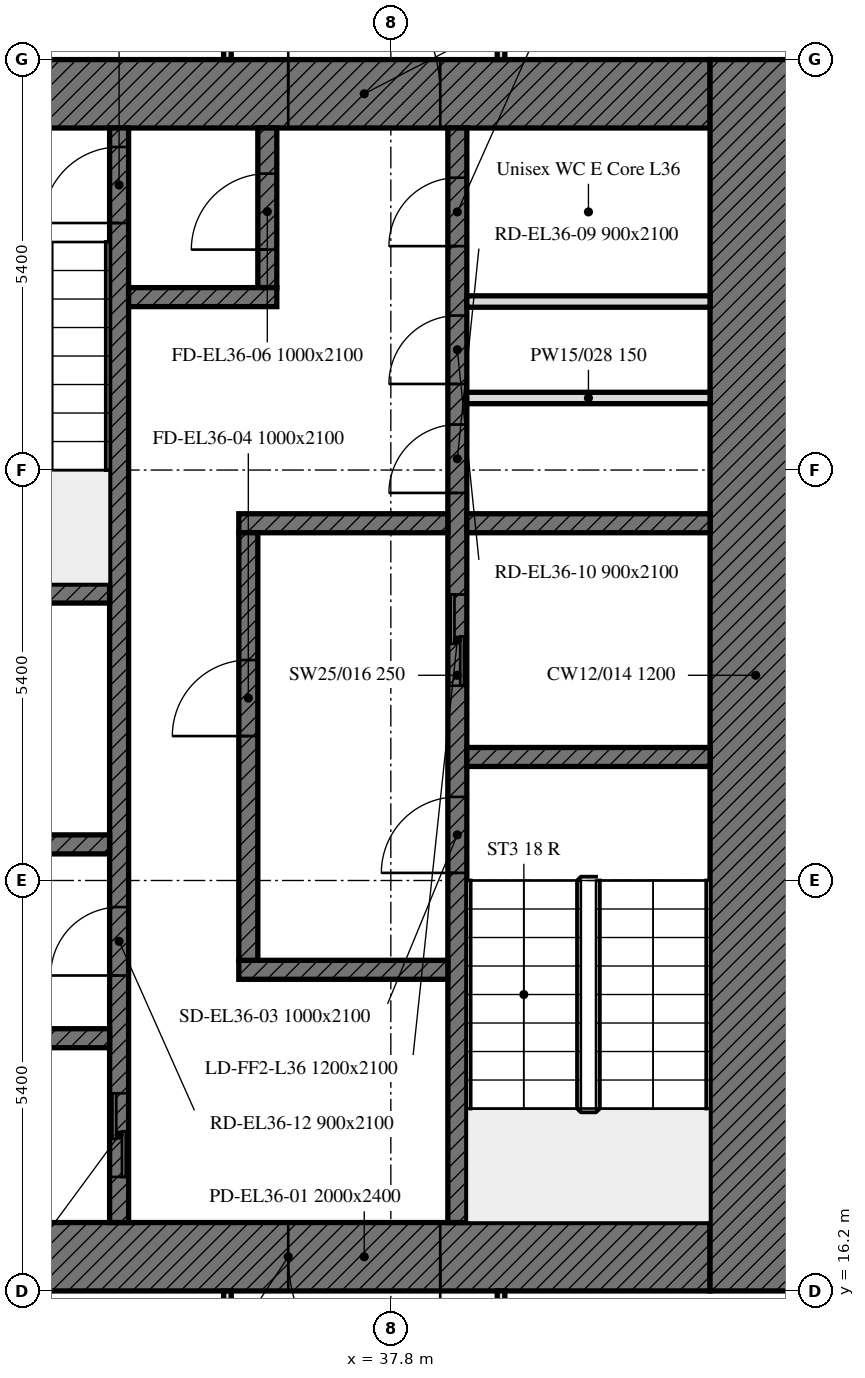
"""IFC4 building model, lengths in metres.
Left out: names, types, materials, properties, quantities, classifications, styles, units other than length and angle.
Written with IfcOpenShell. Run it as: python <this file> out.ifc"""

import sys

from ifc_helpers import new_model, si_unit, direction, frame, frame_2d, origin, place, context, subcontext, project, spatial, rectangle, extrude, element, fill, save


model = new_model("IFC4")
c1 = context("Model", 3, precision=1e-05, world=origin(), true_north=direction((0.0, 1.0)))
c2 = subcontext(c1, "Body", "Model", "MODEL_VIEW")
j1 = project(units=[si_unit("LENGTHUNIT", "METRE"), si_unit("PLANEANGLEUNIT", "RADIAN")], contexts=[c1])
p1 = place(None, origin())
s1 = spatial("IfcSite", under=j1, at=p1, CompositionType="ELEMENT")
p2 = place(p1, origin())
s2 = spatial("IfcBuilding", under=s1, at=p2, CompositionType="ELEMENT")
p3 = place(p2, frame((0.0, 0.0, 156.1)))
s3 = spatial("IfcBuildingStorey", under=s2, at=p3, CompositionType="ELEMENT", Elevation=156.1)
p4 = place(p3, frame((42.0, 16.65, 0.0), z_axis=(0.0, 0.0, 1.0), x_axis=(-1.0, 0.0, 0.0)))
e1 = element("IfcWall", 1, at=p4, inside=s3, PredefinedType="SOLIDWALL", context=c2, shape_type="SweptSolid", body=[
    extrude(rectangle(XDim=11.1, YDim=0.9, at=frame_2d((5.55, 0.0))), origin(), (0.0, 0.0, 1.0), 3.0),
])
p5 = place(p4, frame((3.55, 0.0, 0.0)))
e2 = element("IfcOpeningElement", 2, at=p5, cuts=e1, PredefinedType="OPENING", context=c2, shape_type="SweptSolid", body=[
    extrude(rectangle(XDim=2.0, YDim=2.4, at=frame_2d((1.0, 1.2))), frame((0.0, 0.45, 0.0), z_axis=(0.0, -1.0, 0.0), x_axis=(1.0, 0.0, 0.0)), (0.0, 0.0, 1.0), 0.9),
])
p6 = place(p3, frame((30.9, 31.95, 0.0), z_axis=(0.0, 0.0, 1.0), x_axis=(1.0, 0.0, 0.0)))
e3 = element("IfcWall", 3, at=p6, inside=s3, PredefinedType="SOLIDWALL", context=c2, shape_type="SweptSolid", body=[
    extrude(rectangle(XDim=11.1, YDim=0.9, at=frame_2d((5.55, 0.0))), origin(), (0.0, 0.0, 1.0), 3.0),
])
p7 = place(p6, frame((5.55, 0.0, 0.0)))
e4 = element("IfcOpeningElement", 4, at=p7, cuts=e3, PredefinedType="OPENING", context=c2, shape_type="SweptSolid", body=[
    extrude(rectangle(XDim=2.0, YDim=2.4, at=frame_2d((1.0, 1.2))), frame((0.0, 0.45, 0.0), z_axis=(0.0, -1.0, 0.0), x_axis=(1.0, 0.0, 0.0)), (0.0, 0.0, 1.0), 0.9),
])
p8 = place(p3, frame((42.6, 32.4, 0.0), z_axis=(0.0, 0.0, 1.0), x_axis=(0.0, -1.0, 0.0)))
e5 = element("IfcWall", 5, at=p8, inside=s3, PredefinedType="SOLIDWALL", context=c2, shape_type="SweptSolid", body=[
    extrude(rectangle(XDim=16.2, YDim=1.2, at=frame_2d((8.1, 0.0))), origin(), (0.0, 0.0, 1.0), 3.0),
])
p9 = place(p3, frame((38.675, 17.1, 0.0), z_axis=(0.0, 0.0, 1.0), x_axis=(0.0, 1.0, 0.0)))
e6 = element("IfcWall", 6, at=p9, inside=s3, PredefinedType="SOLIDWALL", context=c2, shape_type="SweptSolid", body=[
    extrude(rectangle(XDim=14.4, YDim=0.25, at=frame_2d((7.2, 0.0))), origin(), (0.0, 0.0, 1.0), 3.0),
])
p10 = place(p9, frame((4.6, 0.0, 0.0)))
e7 = element("IfcOpeningElement", 7, at=p10, cuts=e6, PredefinedType="OPENING", context=c2, shape_type="SweptSolid", body=[
    extrude(rectangle(XDim=1.0, YDim=2.1, at=frame_2d((0.5, 1.05))), frame((0.0, 0.125, 0.0), z_axis=(0.0, -1.0, 0.0), x_axis=(1.0, 0.0, 0.0)), (0.0, 0.0, 1.0), 0.25),
])
p11 = place(p9, frame((7.062, 0.0, 0.0)))
e8 = element("IfcOpeningElement", 8, at=p11, cuts=e6, PredefinedType="OPENING", context=c2, shape_type="SweptSolid", body=[
    extrude(rectangle(XDim=1.2, YDim=2.1, at=frame_2d((0.6, 1.05))), frame((0.0, 0.125, 0.0), z_axis=(0.0, -1.0, 0.0), x_axis=(1.0, 0.0, 0.0)), (0.0, 0.0, 1.0), 0.25),
])
p12 = place(p9, frame((9.599, 0.0, 0.0)))
e9 = element("IfcOpeningElement", 9, at=p12, cuts=e6, PredefinedType="OPENING", context=c2, shape_type="SweptSolid", body=[
    extrude(rectangle(XDim=0.9, YDim=2.1, at=frame_2d((0.45, 1.05))), frame((0.0, 0.125, 0.0), z_axis=(0.0, -1.0, 0.0), x_axis=(1.0, 0.0, 0.0)), (0.0, 0.0, 1.0), 0.25),
])
p13 = place(p9, frame((11.032, 0.0, 0.0)))
e10 = element("IfcOpeningElement", 10, at=p13, cuts=e6, PredefinedType="OPENING", context=c2, shape_type="SweptSolid", body=[
    extrude(rectangle(XDim=0.9, YDim=2.1, at=frame_2d((0.45, 1.05))), frame((0.0, 0.125, 0.0), z_axis=(0.0, -1.0, 0.0), x_axis=(1.0, 0.0, 0.0)), (0.0, 0.0, 1.0), 0.25),
])
p14 = place(p9, frame((12.846, 0.0, 0.0)))
e11 = element("IfcOpeningElement", 11, at=p14, cuts=e6, PredefinedType="OPENING", context=c2, shape_type="SweptSolid", body=[
    extrude(rectangle(XDim=0.9, YDim=2.1, at=frame_2d((0.45, 1.05))), frame((0.0, 0.125, 0.0), z_axis=(0.0, -1.0, 0.0), x_axis=(1.0, 0.0, 0.0)), (0.0, 0.0, 1.0), 0.25),
])
p15 = place(p3, frame((34.225, 17.1, 0.0), z_axis=(0.0, 0.0, 1.0), x_axis=(0.0, 1.0, 0.0)))
e12 = element("IfcWall", 12, at=p15, inside=s3, PredefinedType="SOLIDWALL", context=c2, shape_type="SweptSolid", body=[
    extrude(rectangle(XDim=14.4, YDim=0.25, at=frame_2d((7.2, 0.0))), origin(), (0.0, 0.0, 1.0), 3.0),
])
p16 = place(p15, frame((13.15, 0.0, 0.0)))
e13 = element("IfcOpeningElement", 13, at=p16, cuts=e12, PredefinedType="OPENING", context=c2, shape_type="SweptSolid", body=[
    extrude(rectangle(XDim=1.0, YDim=2.1, at=frame_2d((0.5, 1.05))), frame((0.0, 0.125, 0.0), z_axis=(0.0, -1.0, 0.0), x_axis=(1.0, 0.0, 0.0)), (0.0, 0.0, 1.0), 0.25),
])
p17 = place(p15, frame((0.6, 0.0, 0.0)))
e14 = element("IfcOpeningElement", 14, at=p17, cuts=e12, PredefinedType="OPENING", context=c2, shape_type="SweptSolid", body=[
    extrude(rectangle(XDim=1.1, YDim=2.1, at=frame_2d((0.55, 1.05))), frame((0.0, 0.125, 0.0), z_axis=(0.0, -1.0, 0.0), x_axis=(1.0, 0.0, 0.0)), (0.0, 0.0, 1.0), 0.25),
])
p18 = place(p15, frame((3.25, 0.0, 0.0)))
e15 = element("IfcOpeningElement", 15, at=p18, cuts=e12, PredefinedType="OPENING", context=c2, shape_type="SweptSolid", body=[
    extrude(rectangle(XDim=0.9, YDim=2.1, at=frame_2d((0.45, 1.05))), frame((0.0, 0.125, 0.0), z_axis=(0.0, -1.0, 0.0), x_axis=(1.0, 0.0, 0.0)), (0.0, 0.0, 1.0), 0.25),
])
p19 = place(p3, frame((38.8, 23.225, 0.0), z_axis=(0.0, 0.0, 1.0), x_axis=(1.0, 0.0, 0.0)))
e16 = element("IfcWall", 16, at=p19, inside=s3, PredefinedType="SOLIDWALL", context=c2, shape_type="SweptSolid", body=[
    extrude(rectangle(XDim=3.2, YDim=0.25, at=frame_2d((1.6, 0.0))), origin(), (0.0, 0.0, 1.0), 3.0),
])
for number, where, z_axis, x_axis in (
    (17, (30.9, 25.375, 0.0), (0.0, 0.0, 1.0), (1.0, 0.0, 0.0)),
    (18, (30.9, 22.075, 0.0), (0.0, 0.0, 1.0), (1.0, 0.0, 0.0)),
):
    element("IfcWall", number, at=place(p3, frame(where, z_axis=z_axis, x_axis=x_axis)), inside=s3, PredefinedType="SOLIDWALL", context=c2, shape_type="SweptSolid", body=[
        extrude(rectangle(XDim=3.2, YDim=0.25, at=frame_2d((1.6, 0.0))), origin(), (0.0, 0.0, 1.0), 3.0),
    ])
p20 = place(p3, frame((38.8, 26.3, 0.0), z_axis=(0.0, 0.0, 1.0), x_axis=(1.0, 0.0, 0.0)))
e19 = element("IfcWall", 19, at=p20, inside=s3, PredefinedType="SOLIDWALL", context=c2, shape_type="SweptSolid", body=[
    extrude(rectangle(XDim=3.2, YDim=0.25, at=frame_2d((1.6, 0.0))), origin(), (0.0, 0.0, 1.0), 3.0),
])
for number, where, z_axis, x_axis in (
    (20, (35.8, 26.3, 0.0), (0.0, 0.0, 1.0), (1.0, 0.0, 0.0)),
    (21, (35.8, 20.425, 0.0), (0.0, 0.0, 1.0), (1.0, 0.0, 0.0)),
):
    element("IfcWall", number, at=place(p3, frame(where, z_axis=z_axis, x_axis=x_axis)), inside=s3, PredefinedType="SOLIDWALL", context=c2, shape_type="SweptSolid", body=[
        extrude(rectangle(XDim=2.75, YDim=0.25, at=frame_2d((1.375, 0.0))), origin(), (0.0, 0.0, 1.0), 3.0),
    ])
p21 = place(p3, frame((36.175, 29.4, 0.0), z_axis=(0.0, 0.0, 1.0), x_axis=(0.0, 1.0, 0.0)))
e22 = element("IfcWall", 22, at=p21, inside=s3, PredefinedType="SOLIDWALL", context=c2, shape_type="SweptSolid", body=[
    extrude(rectangle(XDim=2.1, YDim=0.25, at=frame_2d((1.05, 0.0))), origin(), (0.0, 0.0, 1.0), 3.0),
])
p22 = place(p21, frame((0.5, 0.0, 0.0)))
e23 = element("IfcOpeningElement", 23, at=p22, cuts=e22, PredefinedType="OPENING", context=c2, shape_type="SweptSolid", body=[
    extrude(rectangle(XDim=1.0, YDim=2.1, at=frame_2d((0.5, 1.05))), frame((0.0, 0.125, 0.0), z_axis=(0.0, -1.0, 0.0), x_axis=(1.0, 0.0, 0.0)), (0.0, 0.0, 1.0), 0.25),
])
p23 = place(p3, frame((34.35, 29.275, 0.0), z_axis=(0.0, 0.0, 1.0), x_axis=(1.0, 0.0, 0.0)))
e24 = element("IfcWall", 24, at=p23, inside=s3, PredefinedType="SOLIDWALL", context=c2, shape_type="SweptSolid", body=[
    extrude(rectangle(XDim=1.95, YDim=0.25, at=frame_2d((0.975, 0.0))), origin(), (0.0, 0.0, 1.0), 3.0),
])
p24 = place(p3, frame((35.925, 20.55, 0.0), z_axis=(0.0, 0.0, 1.0), x_axis=(0.0, 1.0, 0.0)))
e25 = element("IfcWall", 25, at=p24, inside=s3, PredefinedType="SOLIDWALL", context=c2, shape_type="SweptSolid", body=[
    extrude(rectangle(XDim=5.625, YDim=0.25, at=frame_2d((2.812, 0.0))), origin(), (0.0, 0.0, 1.0), 3.0),
])
p25 = place(p24, frame((2.95, 0.0, 0.0)))
e26 = element("IfcOpeningElement", 26, at=p25, cuts=e25, PredefinedType="OPENING", context=c2, shape_type="SweptSolid", body=[
    extrude(rectangle(XDim=1.0, YDim=2.1, at=frame_2d((0.5, 1.05))), frame((0.0, 0.125, 0.0), z_axis=(0.0, -1.0, 0.0), x_axis=(1.0, 0.0, 0.0)), (0.0, 0.0, 1.0), 0.25),
])
p26 = place(p3, frame((30.9, 19.525, 0.0), z_axis=(0.0, 0.0, 1.0), x_axis=(1.0, 0.0, 0.0)))
e27 = element("IfcWall", 27, at=p26, inside=s3, PredefinedType="SOLIDWALL", context=c2, shape_type="SweptSolid", body=[
    extrude(rectangle(XDim=3.2, YDim=0.25, at=frame_2d((1.6, 0.0))), origin(), (0.0, 0.0, 1.0), 3.0),
])
for number, where, z_axis, x_axis in (
    (28, (38.8, 27.948, 0.0), (0.0, 0.0, 1.0), (1.0, 0.0, 0.0)),
    (29, (38.8, 29.217, 0.0), (0.0, 0.0, 1.0), (1.0, 0.0, 0.0)),
):
    element("IfcWall", number, at=place(p3, frame(where, z_axis=z_axis, x_axis=x_axis)), inside=s3, PredefinedType="PARTITIONING", context=c2, shape_type="SweptSolid", body=[
        extrude(rectangle(XDim=3.2, YDim=0.15, at=frame_2d((1.6, 0.0))), origin(), (0.0, 0.0, 1.0), 3.0),
    ])
for number, where, z_axis, x_axis in (
    (30, (35.65, 35.025, 0.0), (0.0, 0.0, 1.0), (0.0, -1.0, 0.0)),
    (31, (39.25, 32.4, 0.0), (0.0, 0.0, 1.0), (0.0, 1.0, 0.0)),
):
    element("IfcWall", number, at=place(p3, frame(where, z_axis=z_axis, x_axis=x_axis)), inside=s3, PredefinedType="PARTITIONING", context=c2, shape_type="SweptSolid", body=[
        extrude(rectangle(XDim=2.625, YDim=0.1, at=frame_2d((1.312, 0.0))), origin(), (0.0, 0.0, 1.0), 3.0),
    ])
for number, where, z_axis, x_axis in (
    (32, (35.65, 16.2, 0.0), (0.0, 0.0, 1.0), (0.0, -1.0, 0.0)),
    (33, (39.25, 9.075, 0.0), (0.0, 0.0, 1.0), (0.0, 1.0, 0.0)),
):
    element("IfcWall", number, at=place(p3, frame(where, z_axis=z_axis, x_axis=x_axis)), inside=s3, PredefinedType="PARTITIONING", context=c2, shape_type="SweptSolid", body=[
        extrude(rectangle(XDim=7.125, YDim=0.1, at=frame_2d((3.562, 0.0))), origin(), (0.0, 0.0, 1.0), 2.4),
    ])
p27 = place(p5, origin())
e34 = element("IfcDoor", 34, at=p27, inside=s3, OperationType="DOUBLE_DOOR_SINGLE_SWING", PredefinedType="DOOR", context=c2, shape_type="SweptSolid", body=[
    extrude(rectangle(XDim=2.0, YDim=2.4, at=frame_2d((1.0, 1.2))), frame((0.0, 0.025, 0.0), z_axis=(0.0, -1.0, 0.0), x_axis=(1.0, 0.0, 0.0)), (0.0, 0.0, 1.0), 0.05),
])
fill(e2, e34)
p28 = place(p7, origin())
e35 = element("IfcDoor", 35, at=p28, inside=s3, OperationType="DOUBLE_DOOR_SINGLE_SWING", PredefinedType="DOOR", context=c2, shape_type="SweptSolid", body=[
    extrude(rectangle(XDim=2.0, YDim=2.4, at=frame_2d((1.0, 1.2))), frame((0.0, 0.025, 0.0), z_axis=(0.0, -1.0, 0.0), x_axis=(1.0, 0.0, 0.0)), (0.0, 0.0, 1.0), 0.05),
])
fill(e4, e35)
p29 = place(p10, origin())
e36 = element("IfcDoor", 36, at=p29, inside=s3, OperationType="SINGLE_SWING_LEFT", PredefinedType="DOOR", context=c2, shape_type="SweptSolid", body=[
    extrude(rectangle(XDim=1.0, YDim=2.1, at=frame_2d((0.5, 1.05))), frame((0.0, 0.025, 0.0), z_axis=(0.0, -1.0, 0.0), x_axis=(1.0, 0.0, 0.0)), (0.0, 0.0, 1.0), 0.05),
])
fill(e7, e36)
p30 = place(p25, origin())
e37 = element("IfcDoor", 37, at=p30, inside=s3, OperationType="SINGLE_SWING_LEFT", PredefinedType="DOOR", context=c2, shape_type="SweptSolid", body=[
    extrude(rectangle(XDim=1.0, YDim=2.1, at=frame_2d((0.5, 1.05))), frame((0.0, 0.025, 0.0), z_axis=(0.0, -1.0, 0.0), x_axis=(1.0, 0.0, 0.0)), (0.0, 0.0, 1.0), 0.05),
])
fill(e26, e37)
p31 = place(p16, origin())
e38 = element("IfcDoor", 38, at=p31, inside=s3, OperationType="SINGLE_SWING_LEFT", PredefinedType="DOOR", context=c2, shape_type="SweptSolid", body=[
    extrude(rectangle(XDim=1.0, YDim=2.1, at=frame_2d((0.5, 1.05))), frame((0.0, 0.025, 0.0), z_axis=(0.0, -1.0, 0.0), x_axis=(1.0, 0.0, 0.0)), (0.0, 0.0, 1.0), 0.05),
])
fill(e13, e38)
p32 = place(p22, origin())
e39 = element("IfcDoor", 39, at=p32, inside=s3, OperationType="SINGLE_SWING_LEFT", PredefinedType="DOOR", context=c2, shape_type="SweptSolid", body=[
    extrude(rectangle(XDim=1.0, YDim=2.1, at=frame_2d((0.5, 1.05))), frame((0.0, 0.025, 0.0), z_axis=(0.0, -1.0, 0.0), x_axis=(1.0, 0.0, 0.0)), (0.0, 0.0, 1.0), 0.05),
])
fill(e23, e39)
p33 = place(p11, origin())
e40 = element("IfcDoor", 40, at=p33, inside=s3, OperationType="DOUBLE_DOOR_SLIDING", PredefinedType="DOOR", context=c2, shape_type="SweptSolid", body=[
    extrude(rectangle(XDim=1.2, YDim=2.1, at=frame_2d((0.6, 1.05))), frame((0.0, 0.025, 0.0), z_axis=(0.0, -1.0, 0.0), x_axis=(1.0, 0.0, 0.0)), (0.0, 0.0, 1.0), 0.05),
])
fill(e8, e40)
p34 = place(p17, origin())
e41 = element("IfcDoor", 41, at=p34, inside=s3, OperationType="DOUBLE_DOOR_SLIDING", PredefinedType="DOOR", context=c2, shape_type="SweptSolid", body=[
    extrude(rectangle(XDim=1.1, YDim=2.1, at=frame_2d((0.55, 1.05))), frame((0.0, 0.025, 0.0), z_axis=(0.0, -1.0, 0.0), x_axis=(1.0, 0.0, 0.0)), (0.0, 0.0, 1.0), 0.05),
])
fill(e14, e41)
p35 = place(p12, origin())
e42 = element("IfcDoor", 42, at=p35, inside=s3, OperationType="SINGLE_SWING_LEFT", PredefinedType="DOOR", context=c2, shape_type="SweptSolid", body=[
    extrude(rectangle(XDim=0.9, YDim=2.1, at=frame_2d((0.45, 1.05))), frame((0.0, 0.025, 0.0), z_axis=(0.0, -1.0, 0.0), x_axis=(1.0, 0.0, 0.0)), (0.0, 0.0, 1.0), 0.05),
])
fill(e9, e42)
p36 = place(p13, origin())
e43 = element("IfcDoor", 43, at=p36, inside=s3, OperationType="SINGLE_SWING_LEFT", PredefinedType="DOOR", context=c2, shape_type="SweptSolid", body=[
    extrude(rectangle(XDim=0.9, YDim=2.1, at=frame_2d((0.45, 1.05))), frame((0.0, 0.025, 0.0), z_axis=(0.0, -1.0, 0.0), x_axis=(1.0, 0.0, 0.0)), (0.0, 0.0, 1.0), 0.05),
])
fill(e10, e43)
p37 = place(p14, origin())
e44 = element("IfcDoor", 44, at=p37, inside=s3, OperationType="SINGLE_SWING_LEFT", PredefinedType="DOOR", context=c2, shape_type="SweptSolid", body=[
    extrude(rectangle(XDim=0.9, YDim=2.1, at=frame_2d((0.45, 1.05))), frame((0.0, 0.025, 0.0), z_axis=(0.0, -1.0, 0.0), x_axis=(1.0, 0.0, 0.0)), (0.0, 0.0, 1.0), 0.05),
])
fill(e11, e44)
p38 = place(p18, origin())
e45 = element("IfcDoor", 45, at=p38, inside=s3, OperationType="SINGLE_SWING_LEFT", PredefinedType="DOOR", context=c2, shape_type="SweptSolid", body=[
    extrude(rectangle(XDim=0.9, YDim=2.1, at=frame_2d((0.45, 1.05))), frame((0.0, 0.025, 0.0), z_axis=(0.0, -1.0, 0.0), x_axis=(1.0, 0.0, 0.0)), (0.0, 0.0, 1.0), 0.05),
])
fill(e15, e45)
save(model, sys.argv[1])
